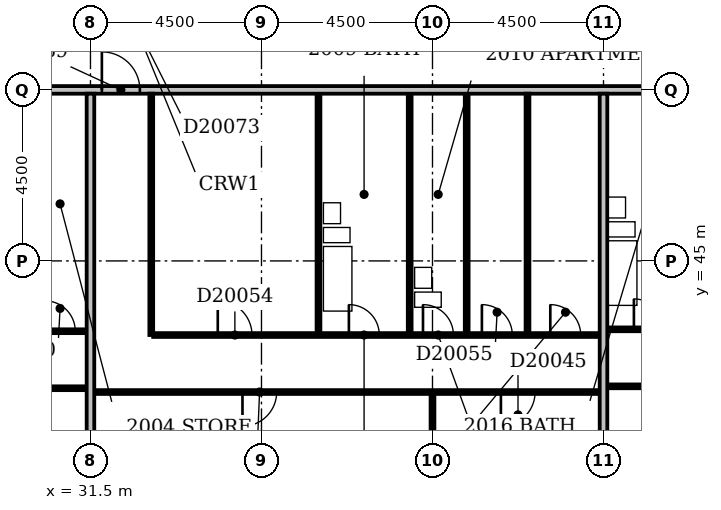
"""IFC4 building model, lengths in metres.
Left out: names, types, materials, properties, quantities, classifications, styles, units other than length and angle.
Written with IfcOpenShell. Run it as: python <this file> out.ifc"""

import sys

from ifc_helpers import new_model, si_unit, direction, frame, frame_2d, origin, place, context, subcontext, project, spatial, rectangle, extrude, element, fill, save


model = new_model("IFC4")
c1 = context("Model", 3, precision=1e-05, world=origin(), true_north=direction((0.0, 1.0)))
c2 = subcontext(c1, "Body", "Model", "MODEL_VIEW")
j1 = project(units=[si_unit("LENGTHUNIT", "METRE"), si_unit("PLANEANGLEUNIT", "RADIAN")], contexts=[c1])
p1 = place(None, origin())
s1 = spatial("IfcSite", under=j1, at=p1, CompositionType="ELEMENT")
p2 = place(p1, origin())
s2 = spatial("IfcBuilding", under=s1, at=p2, CompositionType="ELEMENT")
p3 = place(p2, frame((0.0, 0.0, 83.0)))
s3 = spatial("IfcBuildingStorey", under=s2, at=p3, CompositionType="ELEMENT", Elevation=83.0)
p4 = place(p3, frame((31.5, 36.6, 0.0), z_axis=(0.0, 0.0, 1.0), x_axis=(0.0, 1.0, 0.0)))
e1 = element("IfcWall", 1, at=p4, inside=s3, PredefinedType="PARTITIONING", context=c2, shape_type="SweptSolid", body=[
    extrude(rectangle(XDim=12.8, YDim=0.2, at=frame_2d((6.4, 0.0))), origin(), (0.0, 0.0, 1.0), 3.3),
])
p5 = place(p3, frame((40.5, 36.6, 0.0), z_axis=(0.0, 0.0, 1.0), x_axis=(0.0, 1.0, 0.0)))
e2 = element("IfcWall", 2, at=p5, inside=s3, PredefinedType="PARTITIONING", context=c2, shape_type="SweptSolid", body=[
    extrude(rectangle(XDim=4.9, YDim=0.1, at=frame_2d((2.45, 0.0))), origin(), (0.0, 0.0, 1.0), 3.3),
])
p6 = place(p3, frame((45.0, 36.6, 0.0), z_axis=(0.0, 0.0, 1.0), x_axis=(0.0, 1.0, 0.0)))
e3 = element("IfcWall", 3, at=p6, inside=s3, PredefinedType="PARTITIONING", context=c2, shape_type="SweptSolid", body=[
    extrude(rectangle(XDim=12.8, YDim=0.2, at=frame_2d((6.4, 0.0))), origin(), (0.0, 0.0, 1.0), 2.6),
])
p7 = place(p3, frame((31.6, 41.55, 0.0), z_axis=(0.0, 0.0, 1.0), x_axis=(1.0, 0.0, 0.0)))
e4 = element("IfcWall", 4, at=p7, inside=s3, PredefinedType="PARTITIONING", context=c2, shape_type="SweptSolid", body=[
    extrude(rectangle(XDim=13.3, YDim=0.1, at=frame_2d((6.65, 0.0))), origin(), (0.0, 0.0, 1.0), 3.3),
])
p8 = place(p7, frame((3.9, 0.0, 0.0)))
e5 = element("IfcOpeningElement", 5, at=p8, cuts=e4, PredefinedType="OPENING", context=c2, shape_type="SweptSolid", body=[
    extrude(rectangle(XDim=0.9, YDim=2.1, at=frame_2d((0.45, 1.05))), frame((0.0, 0.062, 0.0), z_axis=(0.0, -1.0, 0.0), x_axis=(1.0, 0.0, 0.0)), (0.0, 0.0, 1.0), 0.124),
])
p9 = place(p7, frame((10.7, 0.0, 0.0)))
e6 = element("IfcOpeningElement", 6, at=p9, cuts=e4, PredefinedType="OPENING", context=c2, shape_type="SweptSolid", body=[
    extrude(rectangle(XDim=0.9, YDim=2.1, at=frame_2d((0.45, 1.05))), frame((0.0, 0.062, 0.0), z_axis=(0.0, -1.0, 0.0), x_axis=(1.0, 0.0, 0.0)), (0.0, 0.0, 1.0), 0.124),
])
p10 = place(p3, frame((22.6, 41.65, 0.0), z_axis=(0.0, 0.0, 1.0), x_axis=(1.0, 0.0, 0.0)))
e7 = element("IfcWall", 7, at=p10, inside=s3, PredefinedType="PARTITIONING", context=c2, shape_type="SweptSolid", body=[
    extrude(rectangle(XDim=8.8, YDim=0.1, at=frame_2d((4.4, 0.0))), origin(), (0.0, 0.0, 1.0), 3.3),
])
p11 = place(p10, frame((1.7, 0.0, 0.0)))
e8 = element("IfcOpeningElement", 8, at=p11, cuts=e7, PredefinedType="OPENING", context=c2, shape_type="SweptSolid", body=[
    extrude(rectangle(XDim=0.9, YDim=2.1, at=frame_2d((0.45, 1.05))), frame((0.0, 0.062, 0.0), z_axis=(0.0, -1.0, 0.0), x_axis=(1.0, 0.0, 0.0)), (0.0, 0.0, 1.0), 0.124),
])
p12 = place(p10, frame((6.2, 0.0, 0.0)))
e9 = element("IfcOpeningElement", 9, at=p12, cuts=e7, PredefinedType="OPENING", context=c2, shape_type="SweptSolid", body=[
    extrude(rectangle(XDim=0.9, YDim=2.1, at=frame_2d((0.45, 1.05))), frame((0.0, 0.062, 0.0), z_axis=(0.0, -1.0, 0.0), x_axis=(1.0, 0.0, 0.0)), (0.0, 0.0, 1.0), 0.124),
])
p13 = place(p3, frame((45.1, 41.7, 0.0), z_axis=(0.0, 0.0, 1.0), x_axis=(1.0, 0.0, 0.0)))
e10 = element("IfcWall", 10, at=p13, inside=s3, PredefinedType="PARTITIONING", context=c2, shape_type="SweptSolid", body=[
    extrude(rectangle(XDim=17.8, YDim=0.1, at=frame_2d((8.9, 0.0))), origin(), (0.0, 0.0, 1.0), 3.3),
])
p14 = place(p13, frame((1.7, 0.0, 0.0)))
e11 = element("IfcOpeningElement", 11, at=p14, cuts=e10, PredefinedType="OPENING", context=c2, shape_type="SweptSolid", body=[
    extrude(rectangle(XDim=0.9, YDim=2.1, at=frame_2d((0.45, 1.05))), frame((0.0, 0.062, 0.0), z_axis=(0.0, -1.0, 0.0), x_axis=(1.0, 0.0, 0.0)), (0.0, 0.0, 1.0), 0.124),
])
p15 = place(p13, frame((6.2, 0.0, 0.0)))
e12 = element("IfcOpeningElement", 12, at=p15, cuts=e10, PredefinedType="OPENING", context=c2, shape_type="SweptSolid", body=[
    extrude(rectangle(XDim=0.9, YDim=2.1, at=frame_2d((0.45, 1.05))), frame((0.0, 0.062, 0.0), z_axis=(0.0, -1.0, 0.0), x_axis=(1.0, 0.0, 0.0)), (0.0, 0.0, 1.0), 0.124),
])
p16 = place(p13, frame((11.85, 0.0, 0.0)))
e13 = element("IfcOpeningElement", 13, at=p16, cuts=e10, PredefinedType="OPENING", context=c2, shape_type="SweptSolid", body=[
    extrude(rectangle(XDim=0.9, YDim=2.1, at=frame_2d((0.45, 1.05))), frame((0.0, 0.062, 0.0), z_axis=(0.0, -1.0, 0.0), x_axis=(1.0, 0.0, 0.0)), (0.0, 0.0, 1.0), 0.124),
])
p17 = place(p13, frame((15.2, 0.0, 0.0)))
e14 = element("IfcOpeningElement", 14, at=p17, cuts=e10, PredefinedType="OPENING", context=c2, shape_type="SweptSolid", body=[
    extrude(rectangle(XDim=0.9, YDim=2.1, at=frame_2d((0.45, 1.05))), frame((0.0, 0.062, 0.0), z_axis=(0.0, -1.0, 0.0), x_axis=(1.0, 0.0, 0.0)), (0.0, 0.0, 1.0), 0.124),
])
p18 = place(p3, frame((33.1, 43.05, 0.0), z_axis=(0.0, 0.0, 1.0), x_axis=(0.0, 1.0, 0.0)))
e15 = element("IfcWall", 15, at=p18, inside=s3, PredefinedType="PARTITIONING", context=c2, shape_type="SweptSolid", body=[
    extrude(rectangle(XDim=6.35, YDim=0.1, at=frame_2d((3.175, 0.0))), origin(), (0.0, 0.0, 1.0), 3.3),
])
p19 = place(p3, frame((33.15, 43.05, 0.0), z_axis=(0.0, 0.0, 1.0), x_axis=(1.0, 0.0, 0.0)))
e16 = element("IfcWall", 16, at=p19, inside=s3, PredefinedType="PARTITIONING", context=c2, shape_type="SweptSolid", body=[
    extrude(rectangle(XDim=11.75, YDim=0.1, at=frame_2d((5.875, 0.0))), origin(), (0.0, 0.0, 1.0), 3.3),
])
p20 = place(p19, frame((5.15, 0.0, 0.0)))
e17 = element("IfcOpeningElement", 17, at=p20, cuts=e16, PredefinedType="OPENING", context=c2, shape_type="SweptSolid", body=[
    extrude(rectangle(XDim=0.8, YDim=2.1, at=frame_2d((0.4, 1.05))), frame((0.0, 0.062, 0.0), z_axis=(0.0, -1.0, 0.0), x_axis=(1.0, 0.0, 0.0)), (0.0, 0.0, 1.0), 0.124),
])
p21 = place(p19, frame((1.7, 0.0, 0.0)))
e18 = element("IfcOpeningElement", 18, at=p21, cuts=e16, PredefinedType="OPENING", context=c2, shape_type="SweptSolid", body=[
    extrude(rectangle(XDim=0.9, YDim=2.1, at=frame_2d((0.45, 1.05))), frame((0.0, 0.062, 0.0), z_axis=(0.0, -1.0, 0.0), x_axis=(1.0, 0.0, 0.0)), (0.0, 0.0, 1.0), 0.124),
])
p22 = place(p19, frame((8.65, 0.0, 0.0)))
e19 = element("IfcOpeningElement", 19, at=p22, cuts=e16, PredefinedType="OPENING", context=c2, shape_type="SweptSolid", body=[
    extrude(rectangle(XDim=0.8, YDim=2.1, at=frame_2d((0.4, 1.05))), frame((0.0, 0.062, 0.0), z_axis=(0.0, -1.0, 0.0), x_axis=(1.0, 0.0, 0.0)), (0.0, 0.0, 1.0), 0.124),
])
p23 = place(p19, frame((10.45, 0.0, 0.0)))
e20 = element("IfcOpeningElement", 20, at=p23, cuts=e16, PredefinedType="OPENING", context=c2, shape_type="SweptSolid", body=[
    extrude(rectangle(XDim=0.8, YDim=2.1, at=frame_2d((0.4, 1.05))), frame((0.0, 0.062, 0.0), z_axis=(0.0, -1.0, 0.0), x_axis=(1.0, 0.0, 0.0)), (0.0, 0.0, 1.0), 0.124),
])
p24 = place(p19, frame((7.1, 0.0, 0.0)))
e21 = element("IfcOpeningElement", 21, at=p24, cuts=e16, PredefinedType="OPENING", context=c2, shape_type="SweptSolid", body=[
    extrude(rectangle(XDim=0.8, YDim=2.1, at=frame_2d((0.4, 1.05))), frame((0.0, 0.062, 0.0), z_axis=(0.0, -1.0, 0.0), x_axis=(1.0, 0.0, 0.0)), (0.0, 0.0, 1.0), 0.124),
])
for number, where, z_axis, x_axis in (
    (22, (37.5, 43.1, 0.0), (0.0, 0.0, 1.0), (0.0, 1.0, 0.0)),
    (23, (39.9, 43.1, 0.0), (0.0, 0.0, 1.0), (0.0, 1.0, 0.0)),
    (24, (41.4, 43.1, 0.0), (0.0, 0.0, 1.0), (0.0, 1.0, 0.0)),
):
    element("IfcWall", number, at=place(p3, frame(where, z_axis=z_axis, x_axis=x_axis)), inside=s3, PredefinedType="PLUMBINGWALL", context=c2, shape_type="SweptSolid", body=[
        extrude(rectangle(XDim=6.3, YDim=0.1, at=frame_2d((3.15, 0.0))), origin(), (0.0, 0.0, 1.0), 3.3),
    ])
p25 = place(p3, frame((43.0, 43.1, 0.0), z_axis=(0.0, 0.0, 1.0), x_axis=(0.0, 1.0, 0.0)))
e25 = element("IfcWall", 25, at=p25, inside=s3, PredefinedType="PARTITIONING", context=c2, shape_type="SweptSolid", body=[
    extrude(rectangle(XDim=6.3, YDim=0.1, at=frame_2d((3.15, 0.0))), origin(), (0.0, 0.0, 1.0), 3.3),
])
p26 = place(p3, frame((24.15, 43.15, 0.0), z_axis=(0.0, 0.0, 1.0), x_axis=(1.0, 0.0, 0.0)))
e26 = element("IfcWall", 26, at=p26, inside=s3, PredefinedType="PARTITIONING", context=c2, shape_type="SweptSolid", body=[
    extrude(rectangle(XDim=7.25, YDim=0.1, at=frame_2d((3.625, 0.0))), origin(), (0.0, 0.0, 1.0), 3.3),
])
p27 = place(p26, frame((4.15, 0.0, 0.0)))
e27 = element("IfcOpeningElement", 27, at=p27, cuts=e26, PredefinedType="OPENING", context=c2, shape_type="SweptSolid", body=[
    extrude(rectangle(XDim=0.8, YDim=2.1, at=frame_2d((0.4, 1.05))), frame((0.0, 0.062, 0.0), z_axis=(0.0, -1.0, 0.0), x_axis=(1.0, 0.0, 0.0)), (0.0, 0.0, 1.0), 0.124),
])
p28 = place(p26, frame((1.2, 0.0, 0.0)))
e28 = element("IfcOpeningElement", 28, at=p28, cuts=e26, PredefinedType="OPENING", context=c2, shape_type="SweptSolid", body=[
    extrude(rectangle(XDim=0.9, YDim=2.1, at=frame_2d((0.45, 1.05))), frame((0.0, 0.062, 0.0), z_axis=(0.0, -1.0, 0.0), x_axis=(1.0, 0.0, 0.0)), (0.0, 0.0, 1.0), 0.124),
])
p29 = place(p26, frame((6.15, 0.0, 0.0)))
e29 = element("IfcOpeningElement", 29, at=p29, cuts=e26, PredefinedType="OPENING", context=c2, shape_type="SweptSolid", body=[
    extrude(rectangle(XDim=0.8, YDim=2.1, at=frame_2d((0.4, 1.05))), frame((0.0, 0.062, 0.0), z_axis=(0.0, -1.0, 0.0), x_axis=(1.0, 0.0, 0.0)), (0.0, 0.0, 1.0), 0.124),
])
p30 = place(p3, frame((45.1, 43.2, 0.0), z_axis=(0.0, 0.0, 1.0), x_axis=(1.0, 0.0, 0.0)))
e30 = element("IfcWall", 30, at=p30, inside=s3, PredefinedType="PARTITIONING", context=c2, shape_type="SweptSolid", body=[
    extrude(rectangle(XDim=2.25, YDim=0.1, at=frame_2d((1.125, 0.0))), origin(), (0.0, 0.0, 1.0), 3.3),
])
p31 = place(p30, frame((0.7, 0.0, 0.0)))
e31 = element("IfcOpeningElement", 31, at=p31, cuts=e30, PredefinedType="OPENING", context=c2, shape_type="SweptSolid", body=[
    extrude(rectangle(XDim=0.8, YDim=2.1, at=frame_2d((0.4, 1.05))), frame((0.0, 0.062, 0.0), z_axis=(0.0, -1.0, 0.0), x_axis=(1.0, 0.0, 0.0)), (0.0, 0.0, 1.0), 0.124),
])
p32 = place(p3, frame((9.1, 49.5, 0.0), z_axis=(0.0, 0.0, 1.0), x_axis=(1.0, 0.0, 0.0)))
e32 = element("IfcWall", 32, at=p32, inside=s3, PredefinedType="PARTITIONING", context=c2, shape_type="SweptSolid", body=[
    extrude(rectangle(XDim=57.8, YDim=0.2, at=frame_2d((28.9, 0.0))), origin(), (0.0, 0.0, 1.0), 3.3),
])
p33 = place(p32, frame((13.7, 0.0, 0.0)))
e33 = element("IfcOpeningElement", 33, at=p33, cuts=e32, PredefinedType="OPENING", context=c2, shape_type="SweptSolid", body=[
    extrude(rectangle(XDim=1.0, YDim=2.1, at=frame_2d((0.5, 1.05))), frame((0.0, 0.112, 0.0), z_axis=(0.0, -1.0, 0.0), x_axis=(1.0, 0.0, 0.0)), (0.0, 0.0, 1.0), 0.224),
])
p34 = place(p32, frame((22.7, 0.0, 0.0)))
e34 = element("IfcOpeningElement", 34, at=p34, cuts=e32, PredefinedType="OPENING", context=c2, shape_type="SweptSolid", body=[
    extrude(rectangle(XDim=1.0, YDim=2.1, at=frame_2d((0.5, 1.05))), frame((0.0, 0.112, 0.0), z_axis=(0.0, -1.0, 0.0), x_axis=(1.0, 0.0, 0.0)), (0.0, 0.0, 1.0), 0.224),
])
p35 = place(p32, frame((38.6, 0.0, 0.0)))
e35 = element("IfcOpeningElement", 35, at=p35, cuts=e32, PredefinedType="OPENING", context=c2, shape_type="SweptSolid", body=[
    extrude(rectangle(XDim=1.0, YDim=2.1, at=frame_2d((0.5, 1.05))), frame((0.0, 0.112, 0.0), z_axis=(0.0, -1.0, 0.0), x_axis=(1.0, 0.0, 0.0)), (0.0, 0.0, 1.0), 0.224),
])
p36 = place(p32, frame((55.45, 0.0, 0.0)))
e36 = element("IfcOpeningElement", 36, at=p36, cuts=e32, PredefinedType="OPENING", context=c2, shape_type="SweptSolid", body=[
    extrude(rectangle(XDim=1.0, YDim=2.1, at=frame_2d((0.5, 1.05))), frame((0.0, 0.112, 0.0), z_axis=(0.0, -1.0, 0.0), x_axis=(1.0, 0.0, 0.0)), (0.0, 0.0, 1.0), 0.224),
])
p37 = place(p32, frame((6.15, 0.0, 0.0)))
e37 = element("IfcOpeningElement", 37, at=p37, cuts=e32, PredefinedType="OPENING", context=c2, shape_type="SweptSolid", body=[
    extrude(rectangle(XDim=0.9, YDim=2.1, at=frame_2d((0.45, 1.05))), frame((0.0, 0.112, 0.0), z_axis=(0.0, -1.0, 0.0), x_axis=(1.0, 0.0, 0.0)), (0.0, 0.0, 1.0), 0.224),
])
p38 = place(p8, frame((0.9, 0.0, 0.0), z_axis=(0.0, 0.0, 1.0), x_axis=(-1.0, 0.0, 0.0)))
e38 = element("IfcDoor", 38, at=p38, inside=s3, OperationType="SINGLE_SWING_RIGHT", PredefinedType="DOOR", context=c2, shape_type="SweptSolid", body=[
    extrude(rectangle(XDim=0.9, YDim=2.1, at=frame_2d((0.45, 1.05))), frame((0.0, 0.025, 0.0), z_axis=(0.0, -1.0, 0.0), x_axis=(1.0, 0.0, 0.0)), (0.0, 0.0, 1.0), 0.05),
])
fill(e5, e38)
p39 = place(p9, frame((0.9, 0.0, 0.0), z_axis=(0.0, 0.0, 1.0), x_axis=(-1.0, 0.0, 0.0)))
e39 = element("IfcDoor", 39, at=p39, inside=s3, OperationType="SINGLE_SWING_RIGHT", PredefinedType="DOOR", context=c2, shape_type="SweptSolid", body=[
    extrude(rectangle(XDim=0.9, YDim=2.1, at=frame_2d((0.45, 1.05))), frame((0.0, 0.025, 0.0), z_axis=(0.0, -1.0, 0.0), x_axis=(1.0, 0.0, 0.0)), (0.0, 0.0, 1.0), 0.05),
])
fill(e6, e39)
p40 = place(p20, origin())
e40 = element("IfcDoor", 40, at=p40, inside=s3, OperationType="SINGLE_SWING_LEFT", PredefinedType="DOOR", context=c2, shape_type="SweptSolid", body=[
    extrude(rectangle(XDim=0.8, YDim=2.1, at=frame_2d((0.4, 1.05))), frame((0.0, 0.025, 0.0), z_axis=(0.0, -1.0, 0.0), x_axis=(1.0, 0.0, 0.0)), (0.0, 0.0, 1.0), 0.05),
])
fill(e17, e40)
p41 = place(p21, origin())
e41 = element("IfcDoor", 41, at=p41, inside=s3, OperationType="SINGLE_SWING_LEFT", PredefinedType="DOOR", context=c2, shape_type="SweptSolid", body=[
    extrude(rectangle(XDim=0.9, YDim=2.1, at=frame_2d((0.45, 1.05))), frame((0.0, 0.025, 0.0), z_axis=(0.0, -1.0, 0.0), x_axis=(1.0, 0.0, 0.0)), (0.0, 0.0, 1.0), 0.05),
])
fill(e18, e41)
p42 = place(p22, origin())
e42 = element("IfcDoor", 42, at=p42, inside=s3, OperationType="SINGLE_SWING_LEFT", PredefinedType="DOOR", context=c2, shape_type="SweptSolid", body=[
    extrude(rectangle(XDim=0.8, YDim=2.1, at=frame_2d((0.4, 1.05))), frame((0.0, 0.025, 0.0), z_axis=(0.0, -1.0, 0.0), x_axis=(1.0, 0.0, 0.0)), (0.0, 0.0, 1.0), 0.05),
])
fill(e19, e42)
p43 = place(p23, origin())
e43 = element("IfcDoor", 43, at=p43, inside=s3, OperationType="SINGLE_SWING_LEFT", PredefinedType="DOOR", context=c2, shape_type="SweptSolid", body=[
    extrude(rectangle(XDim=0.8, YDim=2.1, at=frame_2d((0.4, 1.05))), frame((0.0, 0.025, 0.0), z_axis=(0.0, -1.0, 0.0), x_axis=(1.0, 0.0, 0.0)), (0.0, 0.0, 1.0), 0.05),
])
fill(e20, e43)
p44 = place(p24, origin())
e44 = element("IfcDoor", 44, at=p44, inside=s3, OperationType="SINGLE_SWING_LEFT", PredefinedType="DOOR", context=c2, shape_type="SweptSolid", body=[
    extrude(rectangle(XDim=0.8, YDim=2.1, at=frame_2d((0.4, 1.05))), frame((0.0, 0.025, 0.0), z_axis=(0.0, -1.0, 0.0), x_axis=(1.0, 0.0, 0.0)), (0.0, 0.0, 1.0), 0.05),
])
fill(e21, e44)
p45 = place(p29, origin())
e45 = element("IfcDoor", 45, at=p45, inside=s3, OperationType="SINGLE_SWING_LEFT", PredefinedType="DOOR", context=c2, shape_type="SweptSolid", body=[
    extrude(rectangle(XDim=0.8, YDim=2.1, at=frame_2d((0.4, 1.05))), frame((0.0, 0.025, 0.0), z_axis=(0.0, -1.0, 0.0), x_axis=(1.0, 0.0, 0.0)), (0.0, 0.0, 1.0), 0.05),
])
fill(e29, e45)
p46 = place(p31, origin())
e46 = element("IfcDoor", 46, at=p46, inside=s3, OperationType="SINGLE_SWING_LEFT", PredefinedType="DOOR", context=c2, shape_type="SweptSolid", body=[
    extrude(rectangle(XDim=0.8, YDim=2.1, at=frame_2d((0.4, 1.05))), frame((0.0, 0.025, 0.0), z_axis=(0.0, -1.0, 0.0), x_axis=(1.0, 0.0, 0.0)), (0.0, 0.0, 1.0), 0.05),
])
fill(e31, e46)
p47 = place(p34, origin())
e47 = element("IfcDoor", 47, at=p47, inside=s3, OperationType="SINGLE_SWING_LEFT", PredefinedType="DOOR", context=c2, shape_type="SweptSolid", body=[
    extrude(rectangle(XDim=1.0, YDim=2.1, at=frame_2d((0.5, 1.05))), frame((0.0, 0.025, 0.0), z_axis=(0.0, -1.0, 0.0), x_axis=(1.0, 0.0, 0.0)), (0.0, 0.0, 1.0), 0.05),
])
fill(e34, e47)
save(model, sys.argv[1])
